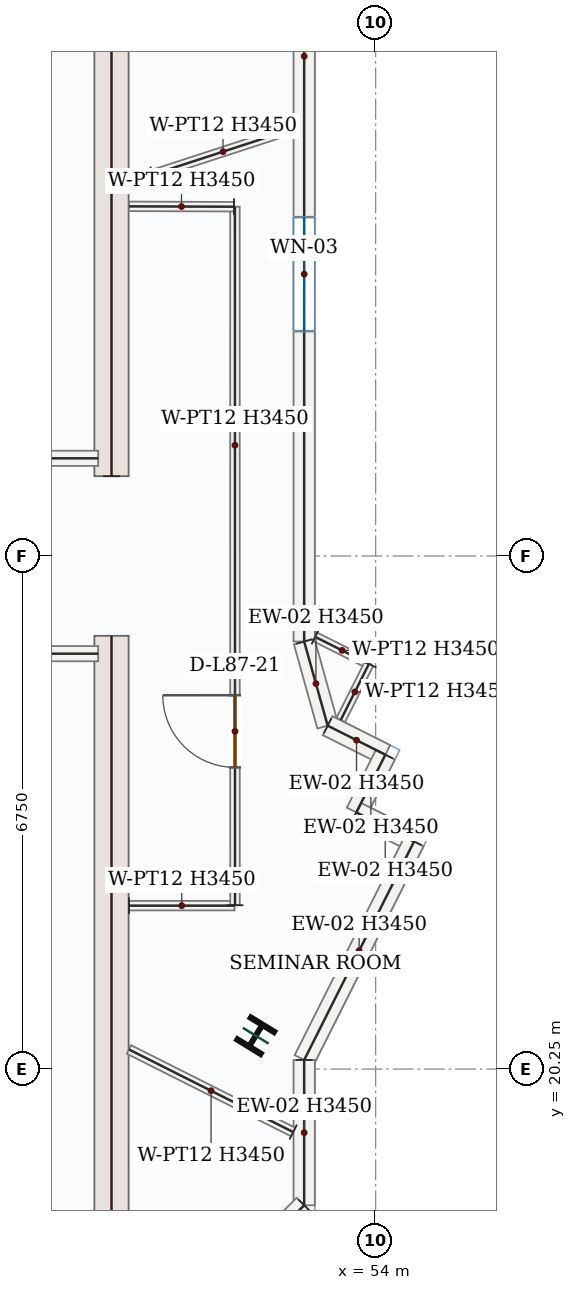
"""IFC4 building model, lengths in metres.
Left out: names, types, materials, properties, quantities, classifications, styles, units other than length and angle.
Written with IfcOpenShell. Run it as: python <this file> out.ifc"""

import sys

from ifc_helpers import new_model, si_unit, direction, frame, frame_2d, origin, origin_2d, place, context, subcontext, project, spatial, rectangle, i_section, extrude, source, transform, mapped, element, fill, save


model = new_model("IFC4")
c1 = context("Model", 3, precision=1e-05, world=origin(), true_north=direction((0.0, 1.0)))
c2 = subcontext(c1, "Body", "Model", "MODEL_VIEW")
j1 = project(units=[si_unit("LENGTHUNIT", "METRE"), si_unit("PLANEANGLEUNIT", "RADIAN")], contexts=[c1])
p1 = place(None, origin())
s1 = spatial("IfcSite", under=j1, at=p1, CompositionType="ELEMENT")
p2 = place(p1, origin())
s2 = spatial("IfcBuilding", under=s1, at=p2, CompositionType="ELEMENT")
p3 = place(p2, frame((0.0, 0.0, 357.3)))
s3 = spatial("IfcBuildingStorey", under=s2, at=p3, CompositionType="ELEMENT", Elevation=357.3)
m1 = source(origin(), c2, "Body", "SweptSolid", [
    extrude(rectangle(XDim=8.55, YDim=0.45, at=frame_2d((4.275, 0.0))), origin(), (0.0, 0.0, 1.0), 3.45),
])
for number, where, z_axis, x_axis in (
    (1, (50.525, 17.4, 0.0), (0.0, 0.0, 1.0), (0.0, 1.0, 0.0)),
    (2, (50.525, 28.05, 0.0), (0.0, 0.0, 1.0), (0.0, 1.0, 0.0)),
):
    element("IfcWall", number, at=place(p3, frame(where, z_axis=z_axis, x_axis=x_axis)), inside=s3, PredefinedType="SHEAR", context=c2, shape_type="MappedRepresentation", body=[
        mapped(m1, transform((0.0, 0.0, 0.0), x_axis=(1.0, 0.0, 0.0), y_axis=(0.0, 1.0, 0.0), z_axis=(0.0, 0.0, 1.0), scale=1.0)),
    ])
m2 = source(origin(), c2, "Body", "SweptSolid", [
    extrude(i_section(OverallWidth=0.369, OverallDepth=0.356, WebThickness=0.011, FlangeThickness=0.018, FilletRadius=0.018, at=origin_2d()), origin(), (0.0, 0.0, 1.0), 3.75),
])
p4 = place(p3, frame((52.423, 20.689, 0.0), z_axis=(0.0, 0.0, 1.0), x_axis=(-0.852640164354, 0.522498564716, 0.0)))
e3 = element("IfcColumn", 3, at=p4, inside=s3, PredefinedType="COLUMN", context=c2, shape_type="MappedRepresentation", body=[
    mapped(m2, transform((0.0, 0.0, 0.0), x_axis=(1.0, 0.0, 0.0), y_axis=(0.0, 1.0, 0.0), z_axis=(0.0, 0.0, 1.0), scale=1.0)),
])
p5 = place(p3, frame((53.06, 35.542, 0.0), z_axis=(0.0, 0.0, 1.0), x_axis=(0.0, -1.0, 0.0)))
e4 = element("IfcWall", 4, at=p5, inside=s3, PredefinedType="SOLIDWALL", context=c2, shape_type="SweptSolid", body=[
    extrude(rectangle(XDim=9.667, YDim=0.28, at=frame_2d((4.834, 0.0))), origin(), (0.0, 0.0, 1.0), 3.45),
])
p6 = place(p5, frame((4.084, 0.0, 0.85)))
e5 = element("IfcOpeningElement", 5, at=p6, cuts=e4, PredefinedType="OPENING", context=c2, shape_type="SweptSolid", body=[
    extrude(rectangle(XDim=1.5, YDim=1.5, at=frame_2d((0.75, 0.75))), frame((0.0, 0.15, 0.0), z_axis=(0.0, -1.0, 0.0), x_axis=(1.0, 0.0, 0.0)), (0.0, 0.0, 1.0), 0.3),
])
m3 = source(origin(), c2, "Body", "SweptSolid", [
    extrude(rectangle(XDim=1.149, YDim=0.28, at=frame_2d((0.575, 0.0))), origin(), (0.0, 0.0, 1.0), 3.45),
])
p7 = place(p3, frame((53.06, 25.875, 0.0), z_axis=(0.0, 0.0, 1.0), x_axis=(0.268739381154, -0.963212928182, 0.0)))
e6 = element("IfcWall", 6, at=p7, inside=s3, PredefinedType="SOLIDWALL", context=c2, shape_type="MappedRepresentation", body=[
    mapped(m3, transform((0.0, 0.0, 0.0), x_axis=(1.0, 0.0, 0.0), y_axis=(0.0, 1.0, 0.0), z_axis=(0.0, 0.0, 1.0), scale=1.0)),
])
m4 = source(origin(), c2, "Body", "SweptSolid", [
    extrude(rectangle(XDim=0.85, YDim=0.28, at=frame_2d((0.425, 0.0))), origin(), (0.0, 0.0, 1.0), 3.45),
])
p8 = place(p3, frame((53.369, 24.768, 0.0), z_axis=(0.0, 0.0, 1.0), x_axis=(0.893448612452, -0.449165422653, 0.0)))
e7 = element("IfcWall", 7, at=p8, inside=s3, PredefinedType="SOLIDWALL", context=c2, shape_type="MappedRepresentation", body=[
    mapped(m4, transform((0.0, 0.0, 0.0), x_axis=(1.0, 0.0, 0.0), y_axis=(0.0, 1.0, 0.0), z_axis=(0.0, 0.0, 1.0), scale=1.0)),
])
m5 = source(origin(), c2, "Body", "SweptSolid", [
    extrude(rectangle(XDim=0.85, YDim=0.28, at=frame_2d((0.425, 0.0))), origin(), (0.0, 0.0, 1.0), 3.45),
])
p9 = place(p3, frame((54.128, 24.386, 0.0), z_axis=(0.0, 0.0, 1.0), x_axis=(-0.449280699695, -0.89339064965, 0.0)))
e8 = element("IfcWall", 8, at=p9, inside=s3, PredefinedType="SOLIDWALL", context=c2, shape_type="MappedRepresentation", body=[
    mapped(m5, transform((0.0, 0.0, 0.0), x_axis=(1.0, 0.0, 0.0), y_axis=(0.0, 1.0, 0.0), z_axis=(0.0, 0.0, 1.0), scale=1.0)),
])
p10 = place(p3, frame((53.747, 23.626, 0.0), z_axis=(0.0, 0.0, 1.0), x_axis=(0.893275332233, -0.449509934066, 0.0)))
e9 = element("IfcWall", 9, at=p10, inside=s3, PredefinedType="SOLIDWALL", context=c2, shape_type="MappedRepresentation", body=[
    mapped(m4, transform((0.0, 0.0, 0.0), x_axis=(1.0, 0.0, 0.0), y_axis=(0.0, 1.0, 0.0), z_axis=(0.0, 0.0, 1.0), scale=1.0)),
])
m6 = source(origin(), c2, "Body", "SweptSolid", [
    extrude(rectangle(XDim=3.218, YDim=0.28, at=frame_2d((1.609, 0.0))), origin(), (0.0, 0.0, 1.0), 3.45),
])
p11 = place(p3, frame((54.506, 23.244, 0.0), z_axis=(0.0, 0.0, 1.0), x_axis=(-0.449336858059, -0.89336240574, 0.0)))
e10 = element("IfcWall", 10, at=p11, inside=s3, PredefinedType="SOLIDWALL", context=c2, shape_type="MappedRepresentation", body=[
    mapped(m6, transform((0.0, 0.0, 0.0), x_axis=(1.0, 0.0, 0.0), y_axis=(0.0, 1.0, 0.0), z_axis=(0.0, 0.0, 1.0), scale=1.0)),
])
m7 = source(origin(), c2, "Body", "SweptSolid", [
    extrude(rectangle(XDim=1.912, YDim=0.28, at=frame_2d((0.956, 0.0))), origin(), (0.0, 0.0, 1.0), 3.45),
])
p12 = place(p3, frame((53.06, 20.37, 0.0), z_axis=(0.0, 0.0, 1.0), x_axis=(0.0, -1.0, 0.0)))
e11 = element("IfcWall", 11, at=p12, inside=s3, PredefinedType="SOLIDWALL", context=c2, shape_type="MappedRepresentation", body=[
    mapped(m7, transform((0.0, 0.0, 0.0), x_axis=(1.0, 0.0, 0.0), y_axis=(0.0, 1.0, 0.0), z_axis=(0.0, 0.0, 1.0), scale=1.0)),
])
m8 = source(origin(), c2, "Body", "SweptSolid", [
    extrude(rectangle(XDim=2.736, YDim=0.28, at=frame_2d((1.368, 0.0))), origin(), (0.0, 0.0, 1.0), 3.45),
])
p13 = place(p3, frame((53.06, 18.458, 0.0), z_axis=(0.0, 0.0, 1.0), x_axis=(-0.707106781187, -0.707106781187, 0.0)))
e12 = element("IfcWall", 12, at=p13, inside=s3, PredefinedType="SOLIDWALL", context=c2, shape_type="MappedRepresentation", body=[
    mapped(m8, transform((0.0, 0.0, 0.0), x_axis=(1.0, 0.0, 0.0), y_axis=(0.0, 1.0, 0.0), z_axis=(0.0, 0.0, 1.0), scale=1.0)),
])
m9 = source(origin(), c2, "Body", "SweptSolid", [
    extrude(rectangle(XDim=4.25, YDim=0.2, at=frame_2d((2.125, 0.0))), origin(), (0.0, 0.0, 1.0), 3.45),
])
for number, where, z_axis, x_axis in (
    (13, (46.1, 25.715, 0.0), (0.0, 0.0, 1.0), (1.0, 0.0, 0.0)),
    (14, (46.1, 28.285, 0.0), (0.0, 0.0, 1.0), (1.0, 0.0, 0.0)),
):
    element("IfcWall", number, at=place(p3, frame(where, z_axis=z_axis, x_axis=x_axis)), inside=s3, PredefinedType="SOLIDWALL", context=c2, shape_type="MappedRepresentation", body=[
        mapped(m9, transform((0.0, 0.0, 0.0), x_axis=(1.0, 0.0, 0.0), y_axis=(0.0, 1.0, 0.0), z_axis=(0.0, 0.0, 1.0), scale=1.0)),
    ])
m10 = source(origin(), c2, "Body", "SweptSolid", [
    extrude(rectangle(XDim=1.389, YDim=0.125, at=frame_2d((0.695, 0.0))), origin(), (0.0, 0.0, 1.0), 3.45),
])
p14 = place(p3, frame((50.755, 22.4, 0.0), z_axis=(0.0, 0.0, 1.0), x_axis=(1.0, 0.0, 0.0)))
e15 = element("IfcWall", 15, at=p14, inside=s3, PredefinedType="PARTITIONING", context=c2, shape_type="MappedRepresentation", body=[
    mapped(m10, transform((0.0, 0.0, 0.0), x_axis=(1.0, 0.0, 0.0), y_axis=(0.0, 1.0, 0.0), z_axis=(0.0, 0.0, 1.0), scale=1.0)),
])
p15 = place(p3, frame((52.15, 22.406, 0.0), z_axis=(0.0, 0.0, 1.0), x_axis=(-0.000132840935, 0.999999991177, 0.0)))
e16 = element("IfcWall", 16, at=p15, inside=s3, PredefinedType="PARTITIONING", context=c2, shape_type="SweptSolid", body=[
    extrude(rectangle(XDim=9.189, YDim=0.125, at=frame_2d((4.595, 0.0))), origin(), (0.0, 0.0, 1.0), 3.45),
])
p16 = place(p15, frame((1.812, 0.0, 0.0)))
e17 = element("IfcOpeningElement", 17, at=p16, cuts=e16, PredefinedType="OPENING", context=c2, shape_type="SweptSolid", body=[
    extrude(rectangle(XDim=0.95, YDim=2.15, at=frame_2d((0.475, 1.075))), frame((0.0, 0.073, 0.0), z_axis=(0.0, -1.0, 0.0), x_axis=(1.0, 0.0, 0.0)), (0.0, 0.0, 1.0), 0.145),
])
m11 = source(origin(), c2, "Body", "SweptSolid", [
    extrude(rectangle(XDim=1.382, YDim=0.125, at=frame_2d((0.691, 0.0))), origin(), (0.0, 0.0, 1.0), 3.45),
])
p17 = place(p3, frame((52.137, 31.595, 0.0), z_axis=(0.0, 0.0, 1.0), x_axis=(-0.999994369671, 0.003355685804, 0.0)))
e18 = element("IfcWall", 18, at=p17, inside=s3, PredefinedType="PARTITIONING", context=c2, shape_type="MappedRepresentation", body=[
    mapped(m11, transform((0.0, 0.0, 0.0), x_axis=(1.0, 0.0, 0.0), y_axis=(0.0, 1.0, 0.0), z_axis=(0.0, 0.0, 1.0), scale=1.0)),
])
m12 = source(origin(), c2, "Body", "SweptSolid", [
    extrude(rectangle(XDim=1.94, YDim=0.125, at=frame_2d((0.97, 0.0))), origin(), (0.0, 0.0, 1.0), 3.45),
])
p18 = place(p3, frame((51.07, 32.019, 0.0), z_axis=(0.0, 0.0, 1.0), x_axis=(0.950812842577, 0.309765941303, 0.0)))
e19 = element("IfcWall", 19, at=p18, inside=s3, PredefinedType="PARTITIONING", context=c2, shape_type="MappedRepresentation", body=[
    mapped(m12, transform((0.0, 0.0, 0.0), x_axis=(1.0, 0.0, 0.0), y_axis=(0.0, 1.0, 0.0), z_axis=(0.0, 0.0, 1.0), scale=1.0)),
])
m13 = source(origin(), c2, "Body", "SweptSolid", [
    extrude(rectangle(XDim=0.791, YDim=0.125, at=frame_2d((0.396, 0.0))), origin(), (0.0, 0.0, 1.0), 3.45),
])
p19 = place(p3, frame((53.205, 25.936, 0.0), z_axis=(0.0, 0.0, 1.0), x_axis=(0.893437787625, -0.449186953999, 0.0)))
e20 = element("IfcWall", 20, at=p19, inside=s3, PredefinedType="PARTITIONING", context=c2, shape_type="MappedRepresentation", body=[
    mapped(m13, transform((0.0, 0.0, 0.0), x_axis=(1.0, 0.0, 0.0), y_axis=(0.0, 1.0, 0.0), z_axis=(0.0, 0.0, 1.0), scale=1.0)),
])
m14 = source(origin(), c2, "Body", "SweptSolid", [
    extrude(rectangle(XDim=0.825, YDim=0.125, at=frame_2d((0.413, 0.0))), origin(), (0.0, 0.0, 1.0), 3.45),
])
p20 = place(p3, frame((53.912, 25.581, 0.0), z_axis=(0.0, 0.0, 1.0), x_axis=(-0.449106057678, -0.893478454669, 0.0)))
e21 = element("IfcWall", 21, at=p20, inside=s3, PredefinedType="PARTITIONING", context=c2, shape_type="MappedRepresentation", body=[
    mapped(m14, transform((0.0, 0.0, 0.0), x_axis=(1.0, 0.0, 0.0), y_axis=(0.0, 1.0, 0.0), z_axis=(0.0, 0.0, 1.0), scale=1.0)),
])
m15 = source(origin(), c2, "Body", "SweptSolid", [
    extrude(rectangle(XDim=2.418, YDim=0.125, at=frame_2d((1.209, 0.0))), origin(), (0.0, 0.0, 1.0), 3.45),
])
p21 = place(p3, frame((52.915, 19.422, 0.0), z_axis=(0.0, 0.0, 1.0), x_axis=(-0.893374646663, 0.449312520078, 0.0)))
e22 = element("IfcWall", 22, at=p21, inside=s3, PredefinedType="PARTITIONING", context=c2, shape_type="MappedRepresentation", body=[
    mapped(m15, transform((0.0, 0.0, 0.0), x_axis=(1.0, 0.0, 0.0), y_axis=(0.0, 1.0, 0.0), z_axis=(0.0, 0.0, 1.0), scale=1.0)),
])
m16 = source(origin(), c2, "Body", "SweptSolid", [
    extrude(rectangle(XDim=1.5, YDim=1.5, at=frame_2d((0.75, 0.75))), frame((0.0, 0.03, 0.0), z_axis=(0.0, -1.0, 0.0), x_axis=(1.0, 0.0, 0.0)), (0.0, 0.0, 1.0), 0.06),
])
p22 = place(p6, origin())
e23 = element("IfcWindow", 23, at=p22, inside=s3, PartitioningType="SINGLE_PANEL", PredefinedType="WINDOW", context=c2, shape_type="MappedRepresentation", body=[
    mapped(m16, transform((0.0, 0.0, 0.0), x_axis=(1.0, 0.0, 0.0), y_axis=(0.0, 1.0, 0.0), z_axis=(0.0, 0.0, 1.0), scale=1.0)),
])
fill(e5, e23)
m17 = source(origin(), c2, "Body", "SweptSolid", [
    extrude(rectangle(XDim=0.95, YDim=2.15, at=frame_2d((0.475, 1.075))), frame((0.0, 0.025, 0.0), z_axis=(0.0, -1.0, 0.0), x_axis=(1.0, 0.0, 0.0)), (0.0, 0.0, 1.0), 0.05),
])
p23 = place(p16, origin())
e24 = element("IfcDoor", 24, at=p23, inside=s3, OperationType="SINGLE_SWING_RIGHT", PredefinedType="DOOR", context=c2, shape_type="MappedRepresentation", body=[
    mapped(m17, transform((0.0, 0.0, 0.0), x_axis=(1.0, 0.0, 0.0), y_axis=(0.0, 1.0, 0.0), z_axis=(0.0, 0.0, 1.0), scale=1.0)),
])
fill(e17, e24)
save(model, sys.argv[1])
